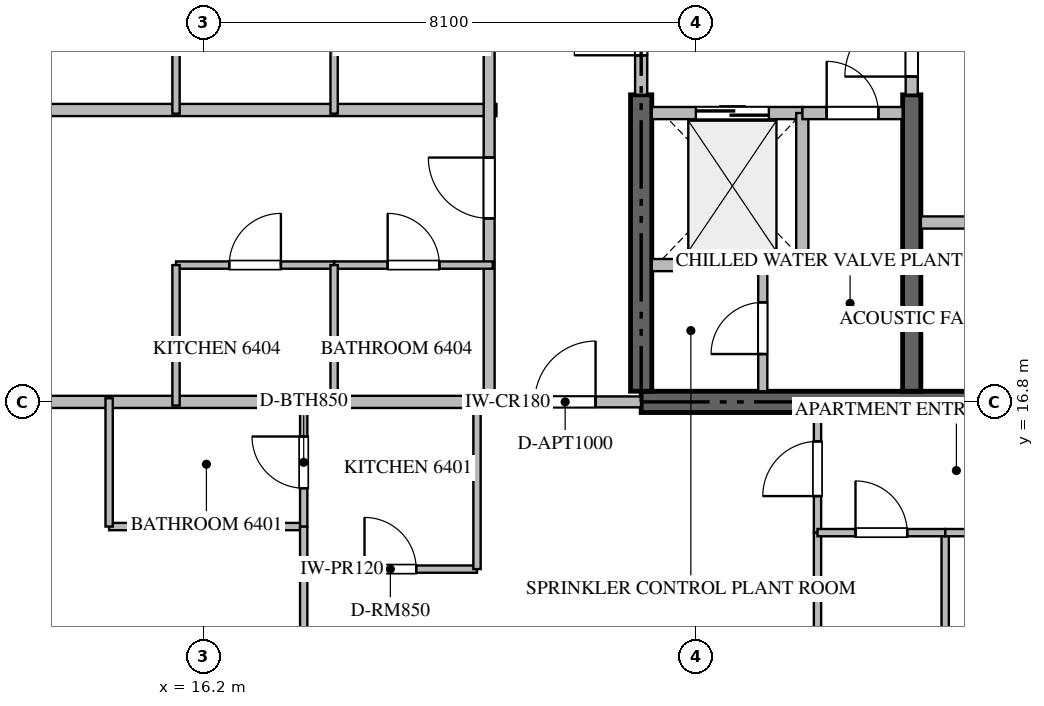
"""IFC4 building model, lengths in metres.
Left out: names, types, materials, properties, quantities, classifications, styles, units other than length and angle.
Written with IfcOpenShell. Run it as: python <this file> out.ifc"""

import sys

from ifc_helpers import new_model, si_unit, direction, frame, frame_2d, origin, place, context, subcontext, project, spatial, rectangle, extrude, source, transform, mapped, element, fill, save


model = new_model("IFC4")
c1 = context("Model", 3, precision=1e-05, world=origin(), true_north=direction((0.0, 1.0)))
c2 = subcontext(c1, "Body", "Model", "MODEL_VIEW")
j1 = project(units=[si_unit("LENGTHUNIT", "METRE"), si_unit("PLANEANGLEUNIT", "RADIAN")], contexts=[c1])
p1 = place(None, origin())
s1 = spatial("IfcSite", under=j1, at=p1, CompositionType="ELEMENT")
p2 = place(p1, origin())
s2 = spatial("IfcBuilding", under=s1, at=p2, CompositionType="ELEMENT")
p3 = place(p2, frame((0.0, 0.0, 256.65)))
s3 = spatial("IfcBuildingStorey", under=s2, at=p3, CompositionType="ELEMENT", Elevation=256.65)
p4 = place(p3, frame((23.4, 16.8, -0.26), z_axis=(0.0, 0.0, 1.0), x_axis=(1.0, 0.0, 0.0)))
e1 = element("IfcWall", 1, at=p4, inside=s3, PredefinedType="SHEAR", context=c2, shape_type="SweptSolid", body=[
    extrude(rectangle(XDim=18.0, YDim=0.35, at=frame_2d((9.0, 0.0))), origin(), (0.0, 0.0, 1.0), 3.848),
])
p5 = place(p3, frame((23.4, 16.975, -0.26), z_axis=(0.0, 0.0, 1.0), x_axis=(0.0, 1.0, 0.0)))
e2 = element("IfcWall", 2, at=p5, inside=s3, PredefinedType="SHEAR", context=c2, shape_type="SweptSolid", body=[
    extrude(rectangle(XDim=4.875, YDim=0.35, at=frame_2d((2.438, 0.0))), origin(), (0.0, 0.0, 1.0), 3.848),
])
p6 = place(p3, frame((27.85, 16.975, -0.26), z_axis=(0.0, 0.0, 1.0), x_axis=(0.0, 1.0, 0.0)))
e3 = element("IfcWall", 3, at=p6, inside=s3, PredefinedType="SHEAR", context=c2, shape_type="SweptSolid", body=[
    extrude(rectangle(XDim=4.875, YDim=0.3, at=frame_2d((2.438, 0.0))), origin(), (0.0, 0.0, 1.0), 3.848),
])
p7 = place(p3, frame((23.575, 21.55, 0.0), z_axis=(0.0, 0.0, 1.0), x_axis=(1.0, 0.0, 0.0)))
e4 = element("IfcWall", 4, at=p7, inside=s3, PredefinedType="STANDARD", context=c2, shape_type="SweptSolid", body=[
    extrude(rectangle(XDim=2.475, YDim=0.2, at=frame_2d((1.238, 0.0))), origin(), (0.0, 0.0, 1.0), 3.59),
])
p8 = place(p7, frame((0.725, 0.0, 0.0)))
e5 = element("IfcOpeningElement", 5, at=p8, cuts=e4, PredefinedType="OPENING", context=c2, shape_type="SweptSolid", body=[
    extrude(rectangle(XDim=1.2, YDim=2.2, at=frame_2d((0.6, 1.1))), frame((0.0, 0.11, 0.0), z_axis=(0.0, -1.0, 0.0), x_axis=(1.0, 0.0, 0.0)), (0.0, 0.0, 1.0), 0.22),
])
p9 = place(p3, frame((26.05, 19.05, 0.0), z_axis=(0.0, 0.0, 1.0), x_axis=(0.0, 1.0, 0.0)))
e6 = element("IfcWall", 6, at=p9, inside=s3, PredefinedType="STANDARD", context=c2, shape_type="SweptSolid", body=[
    extrude(rectangle(XDim=2.5, YDim=0.2, at=frame_2d((1.25, 0.0))), origin(), (0.0, 0.0, 1.0), 3.59),
])
p10 = place(p3, frame((23.575, 19.05, 0.0), z_axis=(0.0, 0.0, 1.0), x_axis=(1.0, 0.0, 0.0)))
e7 = element("IfcWall", 7, at=p10, inside=s3, PredefinedType="STANDARD", context=c2, shape_type="SweptSolid", body=[
    extrude(rectangle(XDim=2.475, YDim=0.2, at=frame_2d((1.238, 0.0))), origin(), (0.0, 0.0, 1.0), 3.59),
])
p11 = place(p3, frame((26.052, 21.55, 0.0), z_axis=(0.0, 0.0, 1.0), x_axis=(1.0, 0.0, 0.0)))
e8 = element("IfcWall", 8, at=p11, inside=s3, PredefinedType="STANDARD", context=c2, shape_type="SweptSolid", body=[
    extrude(rectangle(XDim=1.648, YDim=0.2, at=frame_2d((0.824, 0.0))), origin(), (0.0, 0.0, 1.0), 3.59),
])
p12 = place(p11, frame((0.399, 0.0, 0.0)))
e9 = element("IfcOpeningElement", 9, at=p12, cuts=e8, PredefinedType="OPENING", context=c2, shape_type="SweptSolid", body=[
    extrude(rectangle(XDim=0.85, YDim=2.1, at=frame_2d((0.425, 1.05))), frame((0.0, 0.11, 0.0), z_axis=(0.0, -1.0, 0.0), x_axis=(1.0, 0.0, 0.0)), (0.0, 0.0, 1.0), 0.22),
])
p13 = place(p3, frame((23.4, 21.852, 0.0), z_axis=(0.0, 0.0, 1.0), x_axis=(0.0, 1.0, 0.0)))
e10 = element("IfcWall", 10, at=p13, inside=s3, PredefinedType="STANDARD", context=c2, shape_type="SweptSolid", body=[
    extrude(rectangle(XDim=2.396, YDim=0.2, at=frame_2d((1.198, 0.0))), origin(), (0.0, 0.0, 1.0), 3.59),
])
p14 = place(p13, frame((0.648, 0.0, 0.0)))
e11 = element("IfcOpeningElement", 11, at=p14, cuts=e10, PredefinedType="OPENING", context=c2, shape_type="SweptSolid", body=[
    extrude(rectangle(XDim=1.1, YDim=2.15, at=frame_2d((0.55, 1.075))), frame((0.0, 0.11, 0.0), z_axis=(0.0, -1.0, 0.0), x_axis=(1.0, 0.0, 0.0)), (0.0, 0.0, 1.0), 0.22),
])
p15 = place(p3, frame((27.85, 21.852, 0.0), z_axis=(0.0, 0.0, 1.0), x_axis=(0.0, 1.0, 0.0)))
e12 = element("IfcWall", 12, at=p15, inside=s3, PredefinedType="STANDARD", context=c2, shape_type="SweptSolid", body=[
    extrude(rectangle(XDim=1.696, YDim=0.2, at=frame_2d((0.848, 0.0))), origin(), (0.0, 0.0, 1.0), 3.59),
])
p16 = place(p15, frame((0.298, 0.0, 0.0)))
e13 = element("IfcOpeningElement", 13, at=p16, cuts=e12, PredefinedType="OPENING", context=c2, shape_type="SweptSolid", body=[
    extrude(rectangle(XDim=1.1, YDim=2.15, at=frame_2d((0.55, 1.075))), frame((0.0, 0.11, 0.0), z_axis=(0.0, -1.0, 0.0), x_axis=(1.0, 0.0, 0.0)), (0.0, 0.0, 1.0), 0.22),
])
p17 = place(p3, frame((25.4, 16.975, 0.0), z_axis=(0.0, 0.0, 1.0), x_axis=(0.0, 1.0, 0.0)))
e14 = element("IfcWall", 14, at=p17, inside=s3, PredefinedType="PARTITIONING", context=c2, shape_type="SweptSolid", body=[
    extrude(rectangle(XDim=2.075, YDim=0.15, at=frame_2d((1.038, 0.0))), origin(), (0.0, 0.0, 1.0), 3.59),
])
p18 = place(p17, frame((0.612, 0.0, 0.0)))
e15 = element("IfcOpeningElement", 15, at=p18, cuts=e14, PredefinedType="OPENING", context=c2, shape_type="SweptSolid", body=[
    extrude(rectangle(XDim=0.85, YDim=2.1, at=frame_2d((0.425, 1.05))), frame((0.0, 0.085, 0.0), z_axis=(0.0, -1.0, 0.0), x_axis=(1.0, 0.0, 0.0)), (0.0, 0.0, 1.0), 0.17),
])
p19 = place(p3, frame((28.0, 19.75, 0.0), z_axis=(0.0, 0.0, 1.0), x_axis=(1.0, 0.0, 0.0)))
e16 = element("IfcWall", 16, at=p19, inside=s3, PredefinedType="STANDARD", context=c2, shape_type="SweptSolid", body=[
    extrude(rectangle(XDim=4.4, YDim=0.2, at=frame_2d((2.2, 0.0))), origin(), (0.0, 0.0, 1.0), 3.59),
])
p20 = place(p19, frame((1.75, 0.0, 0.0)))
e17 = element("IfcOpeningElement", 17, at=p20, cuts=e16, PredefinedType="OPENING", context=c2, shape_type="SweptSolid", body=[
    extrude(rectangle(XDim=0.9, YDim=2.1, at=frame_2d((0.45, 1.05))), frame((0.0, 0.11, 0.0), z_axis=(0.0, -1.0, 0.0), x_axis=(1.0, 0.0, 0.0)), (0.0, 0.0, 1.0), 0.22),
])
p21 = place(p3, frame((7.482, 21.6, 0.0), z_axis=(0.0, 0.0, 1.0), x_axis=(1.0, 0.0, 0.0)))
e18 = element("IfcWall", 18, at=p21, inside=s3, PredefinedType="PARTITIONING", context=c2, shape_type="SweptSolid", body=[
    extrude(rectangle(XDim=13.538, YDim=0.2, at=frame_2d((6.769, 0.0))), origin(), (0.0, 0.0, 1.0), 3.59),
])
p22 = place(p3, frame((7.482, 16.8, 0.0), z_axis=(0.0, 0.0, 1.0), x_axis=(1.0, 0.0, 0.0)))
e19 = element("IfcWall", 19, at=p22, inside=s3, PredefinedType="PARTITIONING", context=c2, shape_type="SweptSolid", body=[
    extrude(rectangle(XDim=13.418, YDim=0.2, at=frame_2d((6.709, 0.0))), origin(), (0.0, 0.0, 1.0), 3.59),
])
p23 = place(p3, frame((20.902, 16.8, 0.0), z_axis=(0.0, 0.0, 1.0), x_axis=(1.0, 0.0, 0.0)))
e20 = element("IfcWall", 20, at=p23, inside=s3, PredefinedType="PARTITIONING", context=c2, shape_type="SweptSolid", body=[
    extrude(rectangle(XDim=2.496, YDim=0.18, at=frame_2d((1.248, 0.0))), origin(), (0.0, 0.0, 1.0), 3.59),
])
p24 = place(p23, frame((0.748, 0.0, 0.0)))
e21 = element("IfcOpeningElement", 21, at=p24, cuts=e20, PredefinedType="OPENING", context=c2, shape_type="SweptSolid", body=[
    extrude(rectangle(XDim=1.0, YDim=2.15, at=frame_2d((0.5, 1.075))), frame((0.0, 0.1, 0.0), z_axis=(0.0, -1.0, 0.0), x_axis=(1.0, 0.0, 0.0)), (0.0, 0.0, 1.0), 0.2),
])
p25 = place(p3, frame((20.9, 16.8, 0.0), z_axis=(0.0, 0.0, 1.0), x_axis=(0.0, 1.0, 0.0)))
e22 = element("IfcWall", 22, at=p25, inside=s3, PredefinedType="PARTITIONING", context=c2, shape_type="SweptSolid", body=[
    extrude(rectangle(XDim=16.8, YDim=0.18, at=frame_2d((8.4, 0.0))), origin(), (0.0, 0.0, 1.0), 3.59),
])
p26 = place(p25, frame((3.018, 0.0, 0.0)))
e23 = element("IfcOpeningElement", 23, at=p26, cuts=e22, PredefinedType="OPENING", context=c2, shape_type="SweptSolid", body=[
    extrude(rectangle(XDim=1.0, YDim=2.15, at=frame_2d((0.5, 1.075))), frame((0.0, 0.1, 0.0), z_axis=(0.0, -1.0, 0.0), x_axis=(1.0, 0.0, 0.0)), (0.0, 0.0, 1.0), 0.2),
])
p27 = place(p25, frame((9.18, 0.0, 0.0)))
e24 = element("IfcOpeningElement", 24, at=p27, cuts=e22, PredefinedType="OPENING", context=c2, shape_type="SweptSolid", body=[
    extrude(rectangle(XDim=1.0, YDim=2.15, at=frame_2d((0.5, 1.075))), frame((0.0, 0.1, 0.0), z_axis=(0.0, -1.0, 0.0), x_axis=(1.0, 0.0, 0.0)), (0.0, 0.0, 1.0), 0.2),
])
p28 = place(p25, frame((14.5, 0.0, 0.0)))
e25 = element("IfcOpeningElement", 25, at=p28, cuts=e22, PredefinedType="OPENING", context=c2, shape_type="SweptSolid", body=[
    extrude(rectangle(XDim=1.0, YDim=2.15, at=frame_2d((0.5, 1.075))), frame((0.0, 0.1, 0.0), z_axis=(0.0, -1.0, 0.0), x_axis=(1.0, 0.0, 0.0)), (0.0, 0.0, 1.0), 0.2),
])
p29 = place(p3, frame((17.85, 14.05, 0.0), z_axis=(0.0, 0.0, 1.0), x_axis=(1.0, 0.0, 0.0)))
e26 = element("IfcWall", 26, at=p29, inside=s3, PredefinedType="PARTITIONING", context=c2, shape_type="SweptSolid", body=[
    extrude(rectangle(XDim=2.85, YDim=0.12, at=frame_2d((1.425, 0.0))), origin(), (0.0, 0.0, 1.0), 3.59),
])
p30 = place(p29, frame((1.0, 0.0, 0.0)))
e27 = element("IfcOpeningElement", 27, at=p30, cuts=e26, PredefinedType="OPENING", context=c2, shape_type="SweptSolid", body=[
    extrude(rectangle(XDim=0.85, YDim=2.1, at=frame_2d((0.425, 1.05))), frame((0.0, 0.07, 0.0), z_axis=(0.0, -1.0, 0.0), x_axis=(1.0, 0.0, 0.0)), (0.0, 0.0, 1.0), 0.14),
])
p31 = place(p3, frame((20.7, 14.05, 0.0), z_axis=(0.0, 0.0, 1.0), x_axis=(0.0, 1.0, 0.0)))
e28 = element("IfcWall", 28, at=p31, inside=s3, PredefinedType="PARTITIONING", context=c2, shape_type="SweptSolid", body=[
    extrude(rectangle(XDim=2.81, YDim=0.12, at=frame_2d((1.405, 0.0))), origin(), (0.0, 0.0, 1.0), 3.59),
])
p32 = place(p3, frame((14.65, 14.75, 0.0), z_axis=(0.0, 0.0, 1.0), x_axis=(1.0, 0.0, 0.0)))
e29 = element("IfcWall", 29, at=p32, inside=s3, PredefinedType="PARTITIONING", context=c2, shape_type="SweptSolid", body=[
    extrude(rectangle(XDim=3.2, YDim=0.12, at=frame_2d((1.6, 0.0))), origin(), (0.0, 0.0, 1.0), 3.59),
])
p33 = place(p3, frame((14.65, 14.75, 0.0), z_axis=(0.0, 0.0, 1.0), x_axis=(0.0, 1.0, 0.0)))
e30 = element("IfcWall", 30, at=p33, inside=s3, PredefinedType="PARTITIONING", context=c2, shape_type="SweptSolid", body=[
    extrude(rectangle(XDim=2.11, YDim=0.12, at=frame_2d((1.055, 0.0))), origin(), (0.0, 0.0, 1.0), 3.59),
])
p34 = place(p3, frame((17.85, 10.096, 0.0), z_axis=(0.0, 0.0, 1.0), x_axis=(0.0, 1.0, 0.0)))
e31 = element("IfcWall", 31, at=p34, inside=s3, PredefinedType="PARTITIONING", context=c2, shape_type="SweptSolid", body=[
    extrude(rectangle(XDim=4.654, YDim=0.12, at=frame_2d((2.327, 0.0))), origin(), (0.0, 0.0, 1.0), 3.59),
])
p35 = place(p34, frame((1.902, 0.0, 0.0)))
e32 = element("IfcOpeningElement", 32, at=p35, cuts=e31, PredefinedType="OPENING", context=c2, shape_type="SweptSolid", body=[
    extrude(rectangle(XDim=0.85, YDim=2.1, at=frame_2d((0.425, 1.05))), frame((0.0, 0.07, 0.0), z_axis=(0.0, -1.0, 0.0), x_axis=(1.0, 0.0, 0.0)), (0.0, 0.0, 1.0), 0.14),
])
p36 = place(p3, frame((17.85, 14.752, 0.0), z_axis=(0.0, 0.0, 1.0), x_axis=(0.0, 1.0, 0.0)))
e33 = element("IfcWall", 33, at=p36, inside=s3, PredefinedType="PARTITIONING", context=c2, shape_type="SweptSolid", body=[
    extrude(rectangle(XDim=2.108, YDim=0.12, at=frame_2d((1.054, 0.0))), origin(), (0.0, 0.0, 1.0), 3.59),
])
p37 = place(p36, frame((0.629, 0.0, 0.0)))
e34 = element("IfcOpeningElement", 34, at=p37, cuts=e33, PredefinedType="OPENING", context=c2, shape_type="SweptSolid", body=[
    extrude(rectangle(XDim=0.85, YDim=2.1, at=frame_2d((0.425, 1.05))), frame((0.0, 0.07, 0.0), z_axis=(0.0, -1.0, 0.0), x_axis=(1.0, 0.0, 0.0)), (0.0, 0.0, 1.0), 0.14),
])
p38 = place(p3, frame((26.3, 14.65, 0.0), z_axis=(0.0, 0.0, 1.0), x_axis=(0.0, 1.0, 0.0)))
e35 = element("IfcWall", 35, at=p38, inside=s3, PredefinedType="PARTITIONING", context=c2, shape_type="SweptSolid", body=[
    extrude(rectangle(XDim=1.975, YDim=0.12, at=frame_2d((0.988, 0.0))), origin(), (0.0, 0.0, 1.0), 3.59),
])
p39 = place(p38, frame((0.601, 0.0, 0.0)))
e36 = element("IfcOpeningElement", 36, at=p39, cuts=e35, PredefinedType="OPENING", context=c2, shape_type="SweptSolid", body=[
    extrude(rectangle(XDim=0.9, YDim=2.1, at=frame_2d((0.45, 1.05))), frame((0.0, 0.07, 0.0), z_axis=(0.0, -1.0, 0.0), x_axis=(1.0, 0.0, 0.0)), (0.0, 0.0, 1.0), 0.14),
])
p40 = place(p3, frame((26.3, 7.862, 0.0), z_axis=(0.0, 0.0, 1.0), x_axis=(0.0, 1.0, 0.0)))
e37 = element("IfcWall", 37, at=p40, inside=s3, PredefinedType="PARTITIONING", context=c2, shape_type="SweptSolid", body=[
    extrude(rectangle(XDim=6.786, YDim=0.12, at=frame_2d((3.393, 0.0))), origin(), (0.0, 0.0, 1.0), 3.59),
])
p41 = place(p3, frame((28.4, 7.86, 0.0), z_axis=(0.0, 0.0, 1.0), x_axis=(0.0, 1.0, 0.0)))
e38 = element("IfcWall", 38, at=p41, inside=s3, PredefinedType="PARTITIONING", context=c2, shape_type="SweptSolid", body=[
    extrude(rectangle(XDim=6.79, YDim=0.12, at=frame_2d((3.395, 0.0))), origin(), (0.0, 0.0, 1.0), 3.59),
])
p42 = place(p3, frame((26.3, 14.65, 0.0), z_axis=(0.0, 0.0, 1.0), x_axis=(1.0, 0.0, 0.0)))
e39 = element("IfcWall", 39, at=p42, inside=s3, PredefinedType="PARTITIONING", context=c2, shape_type="SweptSolid", body=[
    extrude(rectangle(XDim=2.1, YDim=0.12, at=frame_2d((1.05, 0.0))), origin(), (0.0, 0.0, 1.0), 3.59),
])
p43 = place(p42, frame((0.625, 0.0, 0.0)))
e40 = element("IfcOpeningElement", 40, at=p43, cuts=e39, PredefinedType="OPENING", context=c2, shape_type="SweptSolid", body=[
    extrude(rectangle(XDim=0.85, YDim=2.1, at=frame_2d((0.425, 1.05))), frame((0.0, 0.07, 0.0), z_axis=(0.0, -1.0, 0.0), x_axis=(1.0, 0.0, 0.0)), (0.0, 0.0, 1.0), 0.14),
])
p44 = place(p3, frame((28.402, 14.65, 0.0), z_axis=(0.0, 0.0, 1.0), x_axis=(1.0, 0.0, 0.0)))
e41 = element("IfcWall", 41, at=p44, inside=s3, PredefinedType="PARTITIONING", context=c2, shape_type="SweptSolid", body=[
    extrude(rectangle(XDim=3.048, YDim=0.12, at=frame_2d((1.524, 0.0))), origin(), (0.0, 0.0, 1.0), 3.59),
])
p45 = place(p44, frame((1.099, 0.0, 0.0)))
e42 = element("IfcOpeningElement", 42, at=p45, cuts=e41, PredefinedType="OPENING", context=c2, shape_type="SweptSolid", body=[
    extrude(rectangle(XDim=0.85, YDim=2.1, at=frame_2d((0.425, 1.05))), frame((0.0, 0.07, 0.0), z_axis=(0.0, -1.0, 0.0), x_axis=(1.0, 0.0, 0.0)), (0.0, 0.0, 1.0), 0.14),
])
p46 = place(p3, frame((15.75, 19.05, 0.0), z_axis=(0.0, 0.0, 1.0), x_axis=(1.0, 0.0, 0.0)))
e43 = element("IfcWall", 43, at=p46, inside=s3, PredefinedType="PARTITIONING", context=c2, shape_type="SweptSolid", body=[
    extrude(rectangle(XDim=2.6, YDim=0.12, at=frame_2d((1.3, 0.0))), origin(), (0.0, 0.0, 1.0), 3.59),
])
p47 = place(p46, frame((0.875, 0.0, 0.0)))
e44 = element("IfcOpeningElement", 44, at=p47, cuts=e43, PredefinedType="OPENING", context=c2, shape_type="SweptSolid", body=[
    extrude(rectangle(XDim=0.85, YDim=2.1, at=frame_2d((0.425, 1.05))), frame((0.0, 0.07, 0.0), z_axis=(0.0, -1.0, 0.0), x_axis=(1.0, 0.0, 0.0)), (0.0, 0.0, 1.0), 0.14),
])
p48 = place(p3, frame((18.352, 19.05, 0.0), z_axis=(0.0, 0.0, 1.0), x_axis=(1.0, 0.0, 0.0)))
e45 = element("IfcWall", 45, at=p48, inside=s3, PredefinedType="PARTITIONING", context=c2, shape_type="SweptSolid", body=[
    extrude(rectangle(XDim=2.608, YDim=0.12, at=frame_2d((1.304, 0.0))), origin(), (0.0, 0.0, 1.0), 3.59),
])
p49 = place(p48, frame((0.879, 0.0, 0.0)))
e46 = element("IfcOpeningElement", 46, at=p49, cuts=e45, PredefinedType="OPENING", context=c2, shape_type="SweptSolid", body=[
    extrude(rectangle(XDim=0.85, YDim=2.1, at=frame_2d((0.425, 1.05))), frame((0.0, 0.07, 0.0), z_axis=(0.0, -1.0, 0.0), x_axis=(1.0, 0.0, 0.0)), (0.0, 0.0, 1.0), 0.14),
])
for number, where, z_axis, x_axis in (
    (47, (18.35, 16.74, 0.0), (0.0, 0.0, 1.0), (0.0, 1.0, 0.0)),
    (48, (15.75, 16.74, 0.0), (0.0, 0.0, 1.0), (0.0, 1.0, 0.0)),
):
    element("IfcWall", number, at=place(p3, frame(where, z_axis=z_axis, x_axis=x_axis)), inside=s3, PredefinedType="PARTITIONING", context=c2, shape_type="SweptSolid", body=[
        extrude(rectangle(XDim=2.31, YDim=0.12, at=frame_2d((1.155, 0.0))), origin(), (0.0, 0.0, 1.0), 3.59),
    ])
for number, where, z_axis, x_axis in (
    (49, (18.35, 21.54, 0.0), (0.0, 0.0, 1.0), (0.0, 1.0, 0.0)),
    (50, (15.75, 21.54, 0.0), (0.0, 0.0, 1.0), (0.0, 1.0, 0.0)),
):
    element("IfcWall", number, at=place(p3, frame(where, z_axis=z_axis, x_axis=x_axis)), inside=s3, PredefinedType="PARTITIONING", context=c2, shape_type="SweptSolid", body=[
        extrude(rectangle(XDim=2.81, YDim=0.12, at=frame_2d((1.405, 0.0))), origin(), (0.0, 0.0, 1.0), 3.59),
    ])
m1 = source(origin(), c2, "Body", "SweptSolid", [
    extrude(rectangle(XDim=1.2, YDim=2.2, at=frame_2d((0.6, 1.1))), frame((0.0, 0.025, 0.0), z_axis=(0.0, -1.0, 0.0), x_axis=(1.0, 0.0, 0.0)), (0.0, 0.0, 1.0), 0.05),
])
p50 = place(p8, origin())
e51 = element("IfcDoor", 51, at=p50, inside=s3, OperationType="DOUBLE_DOOR_SLIDING", PredefinedType="DOOR", context=c2, shape_type="MappedRepresentation", body=[
    mapped(m1, transform((0.0, 0.0, 0.0), scale=1.0)),
])
fill(e5, e51)
m2 = source(origin(), c2, "Body", "SweptSolid", [
    extrude(rectangle(XDim=0.85, YDim=2.1, at=frame_2d((0.425, 1.05))), frame((0.0, 0.025, 0.0), z_axis=(0.0, -1.0, 0.0), x_axis=(1.0, 0.0, 0.0)), (0.0, 0.0, 1.0), 0.05),
])
p51 = place(p12, origin())
e52 = element("IfcDoor", 52, at=p51, inside=s3, OperationType="SINGLE_SWING_LEFT", PredefinedType="DOOR", context=c2, shape_type="MappedRepresentation", body=[
    mapped(m2, transform((0.0, 0.0, 0.0), scale=1.0)),
])
fill(e9, e52)
m3 = source(origin(), c2, "Body", "SweptSolid", [
    extrude(rectangle(XDim=1.1, YDim=2.15, at=frame_2d((0.55, 1.075))), frame((0.0, 0.025, 0.0), z_axis=(0.0, -1.0, 0.0), x_axis=(1.0, 0.0, 0.0)), (0.0, 0.0, 1.0), 0.05),
])
p52 = place(p14, origin())
e53 = element("IfcDoor", 53, at=p52, inside=s3, OperationType="SINGLE_SWING_LEFT", PredefinedType="DOOR", context=c2, shape_type="MappedRepresentation", body=[
    mapped(m3, transform((0.0, 0.0, 0.0), scale=1.0)),
])
fill(e11, e53)
p53 = place(p16, origin())
e54 = element("IfcDoor", 54, at=p53, inside=s3, OperationType="SINGLE_SWING_LEFT", PredefinedType="DOOR", context=c2, shape_type="MappedRepresentation", body=[
    mapped(m3, transform((0.0, 0.0, 0.0), scale=1.0)),
])
fill(e13, e54)
p54 = place(p18, origin())
e55 = element("IfcDoor", 55, at=p54, inside=s3, OperationType="SINGLE_SWING_LEFT", PredefinedType="DOOR", context=c2, shape_type="MappedRepresentation", body=[
    mapped(m2, transform((0.0, 0.0, 0.0), scale=1.0)),
])
fill(e15, e55)
m4 = source(origin(), c2, "Body", "SweptSolid", [
    extrude(rectangle(XDim=1.0, YDim=2.15, at=frame_2d((0.5, 1.075))), frame((0.0, 0.025, 0.0), z_axis=(0.0, -1.0, 0.0), x_axis=(1.0, 0.0, 0.0)), (0.0, 0.0, 1.0), 0.05),
])
p55 = place(p24, origin())
e56 = element("IfcDoor", 56, at=p55, inside=s3, OperationType="SINGLE_SWING_RIGHT", PredefinedType="DOOR", context=c2, shape_type="MappedRepresentation", body=[
    mapped(m4, transform((0.0, 0.0, 0.0), scale=1.0)),
])
fill(e21, e56)
p56 = place(p26, origin())
e57 = element("IfcDoor", 57, at=p56, inside=s3, OperationType="SINGLE_SWING_RIGHT", PredefinedType="DOOR", context=c2, shape_type="MappedRepresentation", body=[
    mapped(m4, transform((0.0, 0.0, 0.0), scale=1.0)),
])
fill(e23, e57)
p57 = place(p30, origin())
e58 = element("IfcDoor", 58, at=p57, inside=s3, OperationType="SINGLE_SWING_LEFT", PredefinedType="DOOR", context=c2, shape_type="MappedRepresentation", body=[
    mapped(m2, transform((0.0, 0.0, 0.0), scale=1.0)),
])
fill(e27, e58)
p58 = place(p37, origin())
e59 = element("IfcDoor", 59, at=p58, inside=s3, OperationType="SINGLE_SWING_RIGHT", PredefinedType="DOOR", context=c2, shape_type="MappedRepresentation", body=[
    mapped(m2, transform((0.0, 0.0, 0.0), scale=1.0)),
])
fill(e34, e59)
m5 = source(origin(), c2, "Body", "SweptSolid", [
    extrude(rectangle(XDim=0.9, YDim=2.1, at=frame_2d((0.45, 1.05))), frame((0.0, 0.025, 0.0), z_axis=(0.0, -1.0, 0.0), x_axis=(1.0, 0.0, 0.0)), (0.0, 0.0, 1.0), 0.05),
])
p59 = place(p39, origin())
e60 = element("IfcDoor", 60, at=p59, inside=s3, OperationType="SINGLE_SWING_LEFT", PredefinedType="DOOR", context=c2, shape_type="MappedRepresentation", body=[
    mapped(m5, transform((0.0, 0.0, 0.0), scale=1.0)),
])
fill(e36, e60)
p60 = place(p43, origin())
e61 = element("IfcDoor", 61, at=p60, inside=s3, OperationType="SINGLE_SWING_LEFT", PredefinedType="DOOR", context=c2, shape_type="MappedRepresentation", body=[
    mapped(m2, transform((0.0, 0.0, 0.0), scale=1.0)),
])
fill(e40, e61)
p61 = place(p47, origin())
e62 = element("IfcDoor", 62, at=p61, inside=s3, OperationType="SINGLE_SWING_RIGHT", PredefinedType="DOOR", context=c2, shape_type="MappedRepresentation", body=[
    mapped(m2, transform((0.0, 0.0, 0.0), scale=1.0)),
])
fill(e44, e62)
p62 = place(p49, origin())
e63 = element("IfcDoor", 63, at=p62, inside=s3, OperationType="SINGLE_SWING_LEFT", PredefinedType="DOOR", context=c2, shape_type="MappedRepresentation", body=[
    mapped(m2, transform((0.0, 0.0, 0.0), scale=1.0)),
])
fill(e46, e63)
save(model, sys.argv[1])
